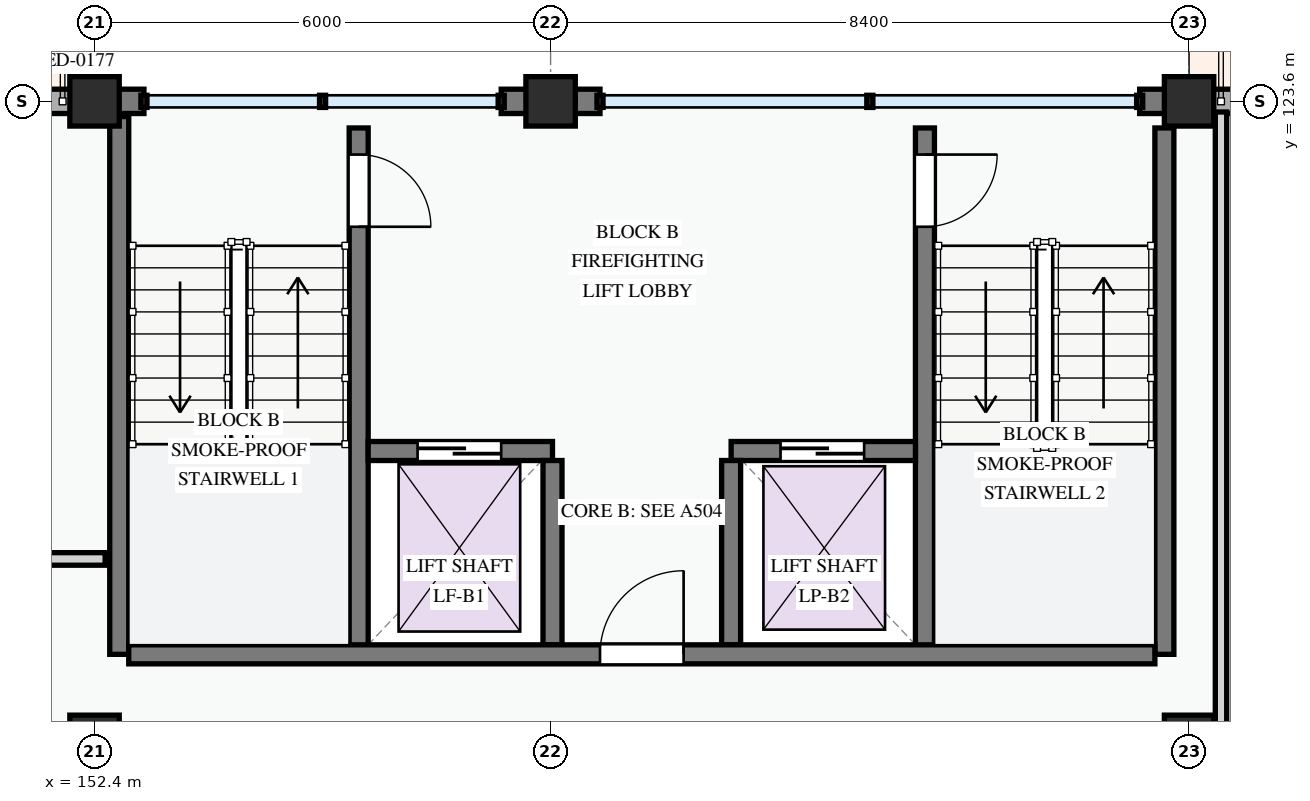
"""IFC4 building model, lengths in metres.
Left out: names, types, materials, properties, quantities, classifications, styles, units other than length and angle.
Written with IfcOpenShell. Run it as: python <this file> out.ifc"""

import sys

from ifc_helpers import new_model, si_unit, direction, frame, frame_2d, origin, origin_2d, place, context, subcontext, project, spatial, rectangle, extrude, element, fill, save


model = new_model("IFC4")
c1 = context("Model", 3, precision=1e-05, world=origin(), true_north=direction((0.0, 1.0)))
c2 = subcontext(c1, "Body", "Model", "MODEL_VIEW")
j1 = project(units=[si_unit("LENGTHUNIT", "METRE"), si_unit("PLANEANGLEUNIT", "RADIAN")], contexts=[c1])
p1 = place(None, origin())
s1 = spatial("IfcSite", under=j1, at=p1, CompositionType="ELEMENT")
p2 = place(p1, origin())
s2 = spatial("IfcBuilding", under=s1, at=p2, CompositionType="ELEMENT")
p3 = place(p2, frame((0.0, 0.0, 18.0)))
s3 = spatial("IfcBuildingStorey", under=s2, at=p3, CompositionType="ELEMENT", Elevation=18.0)
for number, where, z_axis, x_axis in (
    (1, (152.4, 115.2, 0.0), (0.0, 0.0, 1.0), (1.0, 0.0, 0.0)),
    (2, (152.4, 123.6, 0.0), (0.0, 0.0, 1.0), (1.0, 0.0, 0.0)),
    (3, (158.4, 123.6, 0.0), (0.0, 0.0, 1.0), (1.0, 0.0, 0.0)),
    (4, (166.8, 115.2, 0.0), (0.0, 0.0, 1.0), (1.0, 0.0, 0.0)),
    (5, (166.8, 123.6, 0.0), (0.0, 0.0, 1.0), (1.0, 0.0, 0.0)),
):
    element("IfcColumn", number, at=place(p3, frame(where, z_axis=z_axis, x_axis=x_axis)), inside=s3, PredefinedType="COLUMN", context=c2, shape_type="SweptSolid", body=[
        extrude(rectangle(XDim=0.65, YDim=0.65, at=origin_2d()), origin(), (0.0, 0.0, 1.0), 3.3),
    ])
p4 = place(p3, frame((174.0, 123.6, 0.0), z_axis=(0.0, 0.0, 1.0), x_axis=(-1.0, 0.0, 0.0)))
e6 = element("IfcWall", 6, at=p4, inside=s3, PredefinedType="STANDARD", context=c2, shape_type="SweptSolid", body=[
    extrude(rectangle(XDim=7.2, YDim=0.32, at=frame_2d((3.6, 0.0))), origin(), (0.0, 0.0, 1.0), 2.375),
])
p5 = place(p4, frame((0.62, 0.0, 0.0)))
e7 = element("IfcOpeningElement", 7, at=p5, cuts=e6, PredefinedType="OPENING", context=c2, shape_type="SweptSolid", body=[
    extrude(rectangle(XDim=1.6, YDim=2.2, at=frame_2d((0.8, 1.1))), frame((0.0, 0.17, 0.0), z_axis=(0.0, -1.0, 0.0), x_axis=(1.0, 0.0, 0.0)), (0.0, 0.0, 1.0), 0.34),
])
p6 = place(p4, frame((3.285, 0.0, 0.78)))
e8 = element("IfcOpeningElement", 8, at=p6, cuts=e6, PredefinedType="OPENING", context=c2, shape_type="SweptSolid", body=[
    extrude(rectangle(XDim=2.48, YDim=1.46, at=frame_2d((1.24, 0.73))), frame((0.0, 0.17, 0.0), z_axis=(0.0, -1.0, 0.0), x_axis=(1.0, 0.0, 0.0)), (0.0, 0.0, 1.0), 0.34),
])
for number, where, z_axis, x_axis in (
    (9, (166.8, 123.6, 0.0), (0.0, 0.0, 1.0), (-1.0, 0.0, 0.0)),
    (10, (159.05, 123.6, 0.0), (0.0, 0.0, 1.0), (-1.0, 0.0, 0.0)),
):
    element("IfcWall", number, at=place(p3, frame(where, z_axis=z_axis, x_axis=x_axis)), inside=s3, PredefinedType="STANDARD", context=c2, shape_type="SweptSolid", body=[
        extrude(rectangle(XDim=0.65, YDim=0.32, at=frame_2d((0.325, 0.0))), origin(), (0.0, 0.0, 1.0), 3.04),
    ])
p7 = place(p3, frame((158.4, 123.6, 0.0), z_axis=(0.0, 0.0, 1.0), x_axis=(-1.0, 0.0, 0.0)))
e11 = element("IfcWall", 11, at=p7, inside=s3, PredefinedType="STANDARD", context=c2, shape_type="SweptSolid", body=[
    extrude(rectangle(XDim=0.65, YDim=0.32, at=frame_2d((0.325, 0.0))), origin(), (0.0, 0.0, 1.0), 3.04),
])
p8 = place(p3, frame((153.05, 123.6, 0.0), z_axis=(0.0, 0.0, 1.0), x_axis=(-1.0, 0.0, 0.0)))
e12 = element("IfcWall", 12, at=p8, inside=s3, PredefinedType="STANDARD", context=c2, shape_type="SweptSolid", body=[
    extrude(rectangle(XDim=0.65, YDim=0.32, at=frame_2d((0.325, 0.0))), origin(), (0.0, 0.0, 1.0), 3.04),
])
p9 = place(p3, frame((152.4, 123.6, 0.0), z_axis=(0.0, 0.0, 1.0), x_axis=(-1.0, 0.0, 0.0)))
e13 = element("IfcWall", 13, at=p9, inside=s3, PredefinedType="STANDARD", context=c2, shape_type="SweptSolid", body=[
    extrude(rectangle(XDim=8.4, YDim=0.32, at=frame_2d((4.2, 0.0))), origin(), (0.0, 0.0, 1.0), 2.375),
])
p10 = place(p9, frame((0.62, 0.0, 0.0)))
e14 = element("IfcOpeningElement", 14, at=p10, cuts=e13, PredefinedType="OPENING", context=c2, shape_type="SweptSolid", body=[
    extrude(rectangle(XDim=1.2, YDim=2.15, at=frame_2d((0.6, 1.075))), frame((0.0, 0.17, 0.0), z_axis=(0.0, -1.0, 0.0), x_axis=(1.0, 0.0, 0.0)), (0.0, 0.0, 1.0), 0.34),
])
p11 = place(p9, frame((2.99, 0.0, 0.78)))
e15 = element("IfcOpeningElement", 15, at=p11, cuts=e13, PredefinedType="OPENING", context=c2, shape_type="SweptSolid", body=[
    extrude(rectangle(XDim=1.0, YDim=1.25, at=frame_2d((0.5, 0.625))), frame((0.0, 0.17, 0.0), z_axis=(0.0, -1.0, 0.0), x_axis=(1.0, 0.0, 0.0)), (0.0, 0.0, 1.0), 0.34),
])
p12 = place(p9, frame((6.115, 0.0, 0.78)))
e16 = element("IfcOpeningElement", 16, at=p12, cuts=e13, PredefinedType="OPENING", context=c2, shape_type="SweptSolid", body=[
    extrude(rectangle(XDim=0.95, YDim=1.15, at=frame_2d((0.475, 0.575))), frame((0.0, 0.17, 0.0), z_axis=(0.0, -1.0, 0.0), x_axis=(1.0, 0.0, 0.0)), (0.0, 0.0, 1.0), 0.34),
])
p13 = place(p3, frame((155.875, 123.25, 0.0), z_axis=(0.0, 0.0, 1.0), x_axis=(0.0, -1.0, 0.0)))
e17 = element("IfcWall", 17, at=p13, inside=s3, PredefinedType="SHEAR", context=c2, shape_type="SweptSolid", body=[
    extrude(rectangle(XDim=6.925, YDim=0.25, at=frame_2d((3.462, 0.0))), origin(), (0.0, 0.0, 1.0), 3.0),
])
p14 = place(p13, frame((0.35, 0.0, 0.0)))
e18 = element("IfcOpeningElement", 18, at=p14, cuts=e17, PredefinedType="OPENING", context=c2, shape_type="SweptSolid", body=[
    extrude(rectangle(XDim=0.95, YDim=2.1, at=frame_2d((0.475, 1.05))), frame((0.0, 0.135, 0.0), z_axis=(0.0, -1.0, 0.0), x_axis=(1.0, 0.0, 0.0)), (0.0, 0.0, 1.0), 0.27),
])
p15 = place(p3, frame((152.725, 123.4, 0.0), z_axis=(0.0, 0.0, 1.0), x_axis=(0.0, -1.0, 0.0)))
e19 = element("IfcWall", 19, at=p15, inside=s3, PredefinedType="SHEAR", context=c2, shape_type="SweptSolid", body=[
    extrude(rectangle(XDim=7.075, YDim=0.25, at=frame_2d((3.538, 0.0))), origin(), (0.0, 0.0, 1.0), 3.0),
])
p16 = place(p3, frame((166.475, 123.25, 0.0), z_axis=(0.0, 0.0, 1.0), x_axis=(0.0, -1.0, 0.0)))
e20 = element("IfcWall", 20, at=p16, inside=s3, PredefinedType="SHEAR", context=c2, shape_type="SweptSolid", body=[
    extrude(rectangle(XDim=6.925, YDim=0.25, at=frame_2d((3.462, 0.0))), origin(), (0.0, 0.0, 1.0), 3.0),
])
p17 = place(p3, frame((163.325, 123.25, 0.0), z_axis=(0.0, 0.0, 1.0), x_axis=(0.0, -1.0, 0.0)))
e21 = element("IfcWall", 21, at=p17, inside=s3, PredefinedType="SHEAR", context=c2, shape_type="SweptSolid", body=[
    extrude(rectangle(XDim=6.925, YDim=0.25, at=frame_2d((3.462, 0.0))), origin(), (0.0, 0.0, 1.0), 3.0),
])
p18 = place(p17, frame((0.35, 0.0, 0.0)))
e22 = element("IfcOpeningElement", 22, at=p18, cuts=e21, PredefinedType="OPENING", context=c2, shape_type="SweptSolid", body=[
    extrude(rectangle(XDim=0.95, YDim=2.1, at=frame_2d((0.475, 1.05))), frame((0.0, 0.135, 0.0), z_axis=(0.0, -1.0, 0.0), x_axis=(1.0, 0.0, 0.0)), (0.0, 0.0, 1.0), 0.27),
])
p19 = place(p3, frame((156.0, 119.0, 0.0), z_axis=(0.0, 0.0, 1.0), x_axis=(1.0, 0.0, 0.0)))
e23 = element("IfcWall", 23, at=p19, inside=s3, PredefinedType="SHEAR", context=c2, shape_type="SweptSolid", body=[
    extrude(rectangle(XDim=2.425, YDim=0.25, at=frame_2d((1.212, 0.0))), origin(), (0.0, 0.0, 1.0), 3.0),
])
p20 = place(p19, frame((0.65, 0.0, 0.0)))
e24 = element("IfcOpeningElement", 24, at=p20, cuts=e23, PredefinedType="OPENING", context=c2, shape_type="SweptSolid", body=[
    extrude(rectangle(XDim=1.1, YDim=2.15, at=frame_2d((0.55, 1.075))), frame((0.0, 0.135, 0.0), z_axis=(0.0, -1.0, 0.0), x_axis=(1.0, 0.0, 0.0)), (0.0, 0.0, 1.0), 0.27),
])
p21 = place(p3, frame((160.775, 119.0, 0.0), z_axis=(0.0, 0.0, 1.0), x_axis=(1.0, 0.0, 0.0)))
e25 = element("IfcWall", 25, at=p21, inside=s3, PredefinedType="SHEAR", context=c2, shape_type="SweptSolid", body=[
    extrude(rectangle(XDim=2.425, YDim=0.25, at=frame_2d((1.212, 0.0))), origin(), (0.0, 0.0, 1.0), 3.0),
])
p22 = place(p21, frame((0.65, 0.0, 0.0)))
e26 = element("IfcOpeningElement", 26, at=p22, cuts=e25, PredefinedType="OPENING", context=c2, shape_type="SweptSolid", body=[
    extrude(rectangle(XDim=1.1, YDim=2.15, at=frame_2d((0.55, 1.075))), frame((0.0, 0.135, 0.0), z_axis=(0.0, -1.0, 0.0), x_axis=(1.0, 0.0, 0.0)), (0.0, 0.0, 1.0), 0.27),
])
for number, where, z_axis, x_axis in (
    (27, (158.425, 118.875, 0.0), (0.0, 0.0, 1.0), (0.0, -1.0, 0.0)),
    (28, (160.775, 118.875, 0.0), (0.0, 0.0, 1.0), (0.0, -1.0, 0.0)),
):
    element("IfcWall", number, at=place(p3, frame(where, z_axis=z_axis, x_axis=x_axis)), inside=s3, PredefinedType="SHEAR", context=c2, shape_type="SweptSolid", body=[
        extrude(rectangle(XDim=2.425, YDim=0.25, at=frame_2d((1.212, 0.0))), origin(), (0.0, 0.0, 1.0), 3.0),
    ])
p23 = place(p3, frame((152.85, 116.325, 0.0), z_axis=(0.0, 0.0, 1.0), x_axis=(1.0, 0.0, 0.0)))
e29 = element("IfcWall", 29, at=p23, inside=s3, PredefinedType="SHEAR", context=c2, shape_type="SweptSolid", body=[
    extrude(rectangle(XDim=13.5, YDim=0.25, at=frame_2d((6.75, 0.0))), origin(), (0.0, 0.0, 1.0), 3.0),
])
p24 = place(p23, frame((6.2, 0.0, 0.0)))
e30 = element("IfcOpeningElement", 30, at=p24, cuts=e29, PredefinedType="OPENING", context=c2, shape_type="SweptSolid", body=[
    extrude(rectangle(XDim=1.1, YDim=2.15, at=frame_2d((0.55, 1.075))), frame((0.0, 0.135, 0.0), z_axis=(0.0, -1.0, 0.0), x_axis=(1.0, 0.0, 0.0)), (0.0, 0.0, 1.0), 0.27),
])
p25 = place(p3, frame((80.562, 117.58, 0.0), z_axis=(0.0, 0.0, 1.0), x_axis=(1.0, 0.0, 0.0)))
e31 = element("IfcWall", 31, at=p25, inside=s3, PredefinedType="PARTITIONING", context=c2, shape_type="SweptSolid", body=[
    extrude(rectangle(XDim=71.978, YDim=0.165, at=frame_2d((35.989, 0.0))), origin(), (0.0, 0.0, 1.0), 3.0),
])
p26 = place(p25, frame((9.286, 0.0, 0.0)))
e32 = element("IfcOpeningElement", 32, at=p26, cuts=e31, PredefinedType="OPENING", context=c2, shape_type="SweptSolid", body=[
    extrude(rectangle(XDim=0.92, YDim=2.1, at=frame_2d((0.46, 1.05))), frame((0.0, 0.093, 0.0), z_axis=(0.0, -1.0, 0.0), x_axis=(1.0, 0.0, 0.0)), (0.0, 0.0, 1.0), 0.185),
])
p27 = place(p25, frame((23.993, 0.0, 0.0)))
e33 = element("IfcOpeningElement", 33, at=p27, cuts=e31, PredefinedType="OPENING", context=c2, shape_type="SweptSolid", body=[
    extrude(rectangle(XDim=0.92, YDim=2.1, at=frame_2d((0.46, 1.05))), frame((0.0, 0.093, 0.0), z_axis=(0.0, -1.0, 0.0), x_axis=(1.0, 0.0, 0.0)), (0.0, 0.0, 1.0), 0.185),
])
p28 = place(p25, frame((52.703, 0.0, 0.0)))
e34 = element("IfcOpeningElement", 34, at=p28, cuts=e31, PredefinedType="OPENING", context=c2, shape_type="SweptSolid", body=[
    extrude(rectangle(XDim=0.96, YDim=2.12, at=frame_2d((0.48, 1.06))), frame((0.0, 0.093, 0.0), z_axis=(0.0, -1.0, 0.0), x_axis=(1.0, 0.0, 0.0)), (0.0, 0.0, 1.0), 0.185),
])
p29 = place(p3, frame((167.22, 109.442, 0.0), z_axis=(0.0, 0.0, 1.0), x_axis=(0.0, 1.0, 0.0)))
e35 = element("IfcWall", 35, at=p29, inside=s3, PredefinedType="PARTITIONING", context=c2, shape_type="SweptSolid", body=[
    extrude(rectangle(XDim=14.018, YDim=0.15, at=frame_2d((7.009, 0.0))), origin(), (0.0, 0.0, 1.0), 2.425),
])
p30 = place(p29, frame((2.448, 0.0, 0.0)))
e36 = element("IfcOpeningElement", 36, at=p30, cuts=e35, PredefinedType="OPENING", context=c2, shape_type="SweptSolid", body=[
    extrude(rectangle(XDim=0.92, YDim=2.1, at=frame_2d((0.46, 1.05))), frame((0.0, 0.085, 0.0), z_axis=(0.0, -1.0, 0.0), x_axis=(1.0, 0.0, 0.0)), (0.0, 0.0, 1.0), 0.17),
])
p31 = place(p14, origin())
e37 = element("IfcDoor", 37, at=p31, inside=s3, OperationType="SINGLE_SWING_RIGHT", PredefinedType="DOOR", context=c2, shape_type="SweptSolid", body=[
    extrude(rectangle(XDim=0.95, YDim=2.1, at=frame_2d((0.475, 1.05))), frame((0.0, 0.025, 0.0), z_axis=(0.0, -1.0, 0.0), x_axis=(1.0, 0.0, 0.0)), (0.0, 0.0, 1.0), 0.05),
])
fill(e18, e37)
p32 = place(p18, origin())
e38 = element("IfcDoor", 38, at=p32, inside=s3, OperationType="SINGLE_SWING_LEFT", PredefinedType="DOOR", context=c2, shape_type="SweptSolid", body=[
    extrude(rectangle(XDim=0.95, YDim=2.1, at=frame_2d((0.475, 1.05))), frame((0.0, 0.025, 0.0), z_axis=(0.0, -1.0, 0.0), x_axis=(1.0, 0.0, 0.0)), (0.0, 0.0, 1.0), 0.05),
])
fill(e22, e38)
p33 = place(p20, origin())
e39 = element("IfcDoor", 39, at=p33, inside=s3, OperationType="SLIDING_TO_LEFT", PredefinedType="DOOR", context=c2, shape_type="SweptSolid", body=[
    extrude(rectangle(XDim=1.1, YDim=2.15, at=frame_2d((0.55, 1.075))), frame((0.0, 0.025, 0.0), z_axis=(0.0, -1.0, 0.0), x_axis=(1.0, 0.0, 0.0)), (0.0, 0.0, 1.0), 0.05),
])
fill(e24, e39)
p34 = place(p22, origin())
e40 = element("IfcDoor", 40, at=p34, inside=s3, OperationType="SLIDING_TO_LEFT", PredefinedType="DOOR", context=c2, shape_type="SweptSolid", body=[
    extrude(rectangle(XDim=1.1, YDim=2.15, at=frame_2d((0.55, 1.075))), frame((0.0, 0.025, 0.0), z_axis=(0.0, -1.0, 0.0), x_axis=(1.0, 0.0, 0.0)), (0.0, 0.0, 1.0), 0.05),
])
fill(e26, e40)
p35 = place(p24, origin())
e41 = element("IfcDoor", 41, at=p35, inside=s3, OperationType="SINGLE_SWING_RIGHT", PredefinedType="DOOR", context=c2, shape_type="SweptSolid", body=[
    extrude(rectangle(XDim=1.1, YDim=2.15, at=frame_2d((0.55, 1.075))), frame((0.0, 0.025, 0.0), z_axis=(0.0, -1.0, 0.0), x_axis=(1.0, 0.0, 0.0)), (0.0, 0.0, 1.0), 0.05),
])
fill(e30, e41)
save(model, sys.argv[1])
